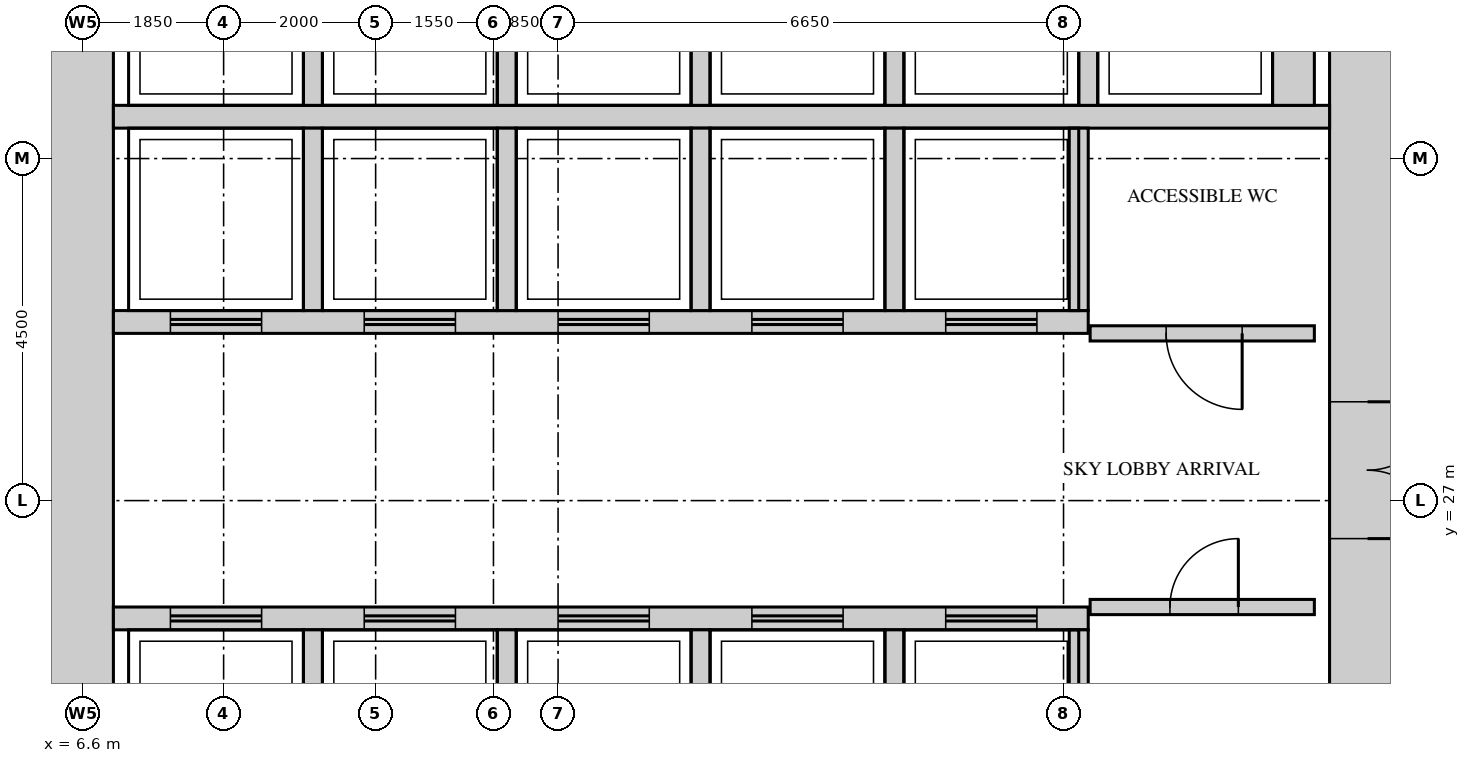
"""IFC4 building model, lengths in metres.
Left out: names, types, materials, properties, quantities, classifications, styles, units other than length and angle.
Written with IfcOpenShell. Run it as: python <this file> out.ifc"""

import sys

from ifc_helpers import new_model, si_unit, direction, frame, frame_2d, origin, place, context, subcontext, project, spatial, rectangle, extrude, source, transform, mapped, element, fill, save


model = new_model("IFC4")
c1 = context("Model", 3, precision=1e-05, world=origin(), true_north=direction((0.0, 1.0)))
c2 = subcontext(c1, "Body", "Model", "MODEL_VIEW")
j1 = project(units=[si_unit("LENGTHUNIT", "METRE"), si_unit("PLANEANGLEUNIT", "RADIAN")], contexts=[c1])
p1 = place(None, origin())
s1 = spatial("IfcSite", under=j1, at=p1, CompositionType="ELEMENT")
p2 = place(p1, origin())
s2 = spatial("IfcBuilding", under=s1, at=p2, CompositionType="ELEMENT")
p3 = place(p2, frame((0.0, 0.0, 158.7)))
s3 = spatial("IfcBuildingStorey", under=s2, at=p3, CompositionType="ELEMENT", Elevation=158.7)
m1 = source(origin(), c2, "Body", "SweptSolid", [
    extrude(rectangle(XDim=28.0, YDim=1.0, at=frame_2d((14.0, 0.0))), origin(), (0.0, 0.0, 1.0), 5.75),
])
p4 = place(p3, frame((23.5, 13.0, 0.0), z_axis=(0.0, 0.0, 1.0), x_axis=(0.0, 1.0, 0.0)))
e1 = element("IfcWall", 1, at=p4, inside=s3, PredefinedType="SHEAR", context=c2, shape_type="MappedRepresentation", body=[
    mapped(m1, transform((0.0, 0.0, 0.0))),
])
m2 = source(origin(), c2, "Body", "SweptSolid", [
    extrude(rectangle(XDim=1.8, YDim=2.1, at=frame_2d((0.9, 1.05))), frame((0.0, 0.51, 0.0), z_axis=(0.0, -1.0, 0.0), x_axis=(1.0, 0.0, 0.0)), (0.0, 0.0, 1.0), 1.02),
])
p5 = place(p4, frame((13.5, 0.0, 0.0)))
e2 = element("IfcOpeningElement", 2, at=p5, cuts=e1, PredefinedType="OPENING", context=c2, shape_type="MappedRepresentation", body=[
    mapped(m2, transform((0.0, 0.0, 0.0))),
])
p6 = place(p4, frame((22.6, 0.0, 0.0)))
e3 = element("IfcOpeningElement", 3, at=p6, cuts=e1, PredefinedType="OPENING", context=c2, shape_type="MappedRepresentation", body=[
    mapped(m2, transform((0.0, 0.0, 0.0))),
])
m3 = source(origin(), c2, "Body", "SweptSolid", [
    extrude(rectangle(XDim=0.9, YDim=2.1, at=frame_2d((0.45, 1.05))), frame((0.0, 0.51, 0.0), z_axis=(0.0, -1.0, 0.0), x_axis=(1.0, 0.0, 0.0)), (0.0, 0.0, 1.0), 1.02),
])
p7 = place(p4, frame((2.15, 0.0, 0.0)))
e4 = element("IfcOpeningElement", 4, at=p7, cuts=e1, PredefinedType="OPENING", context=c2, shape_type="MappedRepresentation", body=[
    mapped(m3, transform((0.0, 0.0, 0.0))),
])
p8 = place(p4, frame((7.0, 0.0, 0.0)))
e5 = element("IfcOpeningElement", 5, at=p8, cuts=e1, PredefinedType="OPENING", context=c2, shape_type="MappedRepresentation", body=[
    mapped(m3, transform((0.0, 0.0, 0.0))),
])
p9 = place(p3, frame((6.5, 13.0, 0.0), z_axis=(0.0, 0.0, 1.0), x_axis=(0.0, 1.0, 0.0)))
e6 = element("IfcWall", 6, at=p9, inside=s3, PredefinedType="SHEAR", context=c2, shape_type="MappedRepresentation", body=[
    mapped(m1, transform((0.0, 0.0, 0.0))),
])
m4 = source(origin(), c2, "Body", "SweptSolid", [
    extrude(rectangle(XDim=16.0, YDim=0.3, at=frame_2d((8.0, 0.0))), origin(), (0.0, 0.0, 1.0), 5.75),
])
p10 = place(p3, frame((7.0, 32.05, 0.0), z_axis=(0.0, 0.0, 1.0), x_axis=(1.0, 0.0, 0.0)))
e7 = element("IfcWall", 7, at=p10, inside=s3, PredefinedType="STANDARD", context=c2, shape_type="MappedRepresentation", body=[
    mapped(m4, transform((0.0, 0.0, 0.0))),
])
m5 = source(origin(), c2, "Body", "SweptSolid", [
    extrude(rectangle(XDim=12.825, YDim=0.3, at=frame_2d((6.413, 0.0))), origin(), (0.0, 0.0, 1.0), 5.75),
])
p11 = place(p3, frame((7.0, 29.35, 0.0), z_axis=(0.0, 0.0, 1.0), x_axis=(1.0, 0.0, 0.0)))
e8 = element("IfcWall", 8, at=p11, inside=s3, PredefinedType="STANDARD", context=c2, shape_type="MappedRepresentation", body=[
    mapped(m5, transform((0.0, 0.0, 0.0))),
])
m6 = source(origin(), c2, "Body", "SweptSolid", [
    extrude(rectangle(XDim=1.2, YDim=2.1, at=frame_2d((0.6, 1.05))), frame((0.0, 0.16, 0.0), z_axis=(0.0, -1.0, 0.0), x_axis=(1.0, 0.0, 0.0)), (0.0, 0.0, 1.0), 0.32),
])
p12 = place(p11, frame((0.75, 0.0, 0.0)))
e9 = element("IfcOpeningElement", 9, at=p12, cuts=e8, PredefinedType="OPENING", context=c2, shape_type="MappedRepresentation", body=[
    mapped(m6, transform((0.0, 0.0, 0.0))),
])
p13 = place(p11, frame((3.3, 0.0, 0.0)))
e10 = element("IfcOpeningElement", 10, at=p13, cuts=e8, PredefinedType="OPENING", context=c2, shape_type="MappedRepresentation", body=[
    mapped(m6, transform((0.0, 0.0, 0.0))),
])
p14 = place(p11, frame((5.85, 0.0, 0.0)))
e11 = element("IfcOpeningElement", 11, at=p14, cuts=e8, PredefinedType="OPENING", context=c2, shape_type="MappedRepresentation", body=[
    mapped(m6, transform((0.0, 0.0, 0.0))),
])
p15 = place(p11, frame((8.4, 0.0, 0.0)))
e12 = element("IfcOpeningElement", 12, at=p15, cuts=e8, PredefinedType="OPENING", context=c2, shape_type="MappedRepresentation", body=[
    mapped(m6, transform((0.0, 0.0, 0.0))),
])
p16 = place(p11, frame((10.95, 0.0, 0.0)))
e13 = element("IfcOpeningElement", 13, at=p16, cuts=e8, PredefinedType="OPENING", context=c2, shape_type="MappedRepresentation", body=[
    mapped(m6, transform((0.0, 0.0, 0.0))),
])
p17 = place(p3, frame((7.0, 25.45, 0.0), z_axis=(0.0, 0.0, 1.0), x_axis=(1.0, 0.0, 0.0)))
e14 = element("IfcWall", 14, at=p17, inside=s3, PredefinedType="STANDARD", context=c2, shape_type="MappedRepresentation", body=[
    mapped(m5, transform((0.0, 0.0, 0.0))),
])
p18 = place(p17, frame((0.75, 0.0, 0.0)))
e15 = element("IfcOpeningElement", 15, at=p18, cuts=e14, PredefinedType="OPENING", context=c2, shape_type="MappedRepresentation", body=[
    mapped(m6, transform((0.0, 0.0, 0.0))),
])
p19 = place(p17, frame((3.3, 0.0, 0.0)))
e16 = element("IfcOpeningElement", 16, at=p19, cuts=e14, PredefinedType="OPENING", context=c2, shape_type="MappedRepresentation", body=[
    mapped(m6, transform((0.0, 0.0, 0.0))),
])
p20 = place(p17, frame((5.85, 0.0, 0.0)))
e17 = element("IfcOpeningElement", 17, at=p20, cuts=e14, PredefinedType="OPENING", context=c2, shape_type="MappedRepresentation", body=[
    mapped(m6, transform((0.0, 0.0, 0.0))),
])
p21 = place(p17, frame((8.4, 0.0, 0.0)))
e18 = element("IfcOpeningElement", 18, at=p21, cuts=e14, PredefinedType="OPENING", context=c2, shape_type="MappedRepresentation", body=[
    mapped(m6, transform((0.0, 0.0, 0.0))),
])
p22 = place(p17, frame((10.95, 0.0, 0.0)))
e19 = element("IfcOpeningElement", 19, at=p22, cuts=e14, PredefinedType="OPENING", context=c2, shape_type="MappedRepresentation", body=[
    mapped(m6, transform((0.0, 0.0, 0.0))),
])
m7 = source(origin(), c2, "Body", "SweptSolid", [
    extrude(rectangle(XDim=2.4, YDim=0.25, at=frame_2d((1.2, 0.0))), origin(), (0.0, 0.0, 1.0), 5.75),
])
for number, where, z_axis, x_axis in (
    (20, (17.275, 29.5, 0.0), (0.0, 0.0, 1.0), (0.0, 1.0, 0.0)),
    (21, (19.7, 29.5, 0.0), (0.0, 0.0, 1.0), (0.0, 1.0, 0.0)),
    (22, (9.625, 29.5, 0.0), (0.0, 0.0, 1.0), (0.0, 1.0, 0.0)),
    (23, (12.175, 29.5, 0.0), (0.0, 0.0, 1.0), (0.0, 1.0, 0.0)),
    (24, (14.725, 29.5, 0.0), (0.0, 0.0, 1.0), (0.0, 1.0, 0.0)),
):
    element("IfcWall", number, at=place(p3, frame(where, z_axis=z_axis, x_axis=x_axis)), inside=s3, PredefinedType="STANDARD", context=c2, shape_type="MappedRepresentation", body=[
        mapped(m7, transform((0.0, 0.0, 0.0))),
    ])
m8 = source(origin(), c2, "Body", "SweptSolid", [
    extrude(rectangle(XDim=2.4, YDim=0.25, at=frame_2d((1.2, 0.0))), origin(), (0.0, 0.0, 1.0), 5.75),
])
for number, where, z_axis, x_axis in (
    (25, (17.275, 22.9, 0.0), (0.0, 0.0, 1.0), (0.0, 1.0, 0.0)),
    (26, (19.7, 22.9, 0.0), (0.0, 0.0, 1.0), (0.0, 1.0, 0.0)),
    (27, (9.625, 22.9, 0.0), (0.0, 0.0, 1.0), (0.0, 1.0, 0.0)),
    (28, (12.175, 22.9, 0.0), (0.0, 0.0, 1.0), (0.0, 1.0, 0.0)),
    (29, (14.725, 22.9, 0.0), (0.0, 0.0, 1.0), (0.0, 1.0, 0.0)),
    (30, (9.625, 32.2, 0.0), (0.0, 0.0, 1.0), (0.0, 1.0, 0.0)),
    (31, (12.175, 32.2, 0.0), (0.0, 0.0, 1.0), (0.0, 1.0, 0.0)),
    (32, (14.725, 32.2, 0.0), (0.0, 0.0, 1.0), (0.0, 1.0, 0.0)),
    (33, (17.275, 32.2, 0.0), (0.0, 0.0, 1.0), (0.0, 1.0, 0.0)),
    (34, (19.825, 32.2, 0.0), (0.0, 0.0, 1.0), (0.0, 1.0, 0.0)),
):
    element("IfcWall", number, at=place(p3, frame(where, z_axis=z_axis, x_axis=x_axis)), inside=s3, PredefinedType="STANDARD", context=c2, shape_type="MappedRepresentation", body=[
        mapped(m8, transform((0.0, 0.0, 0.0))),
    ])
m9 = source(origin(), c2, "Body", "SweptSolid", [
    extrude(rectangle(XDim=2.4, YDim=0.55, at=frame_2d((1.2, 0.0))), origin(), (0.0, 0.0, 1.0), 5.75),
])
p23 = place(p3, frame((22.525, 32.2, 0.0), z_axis=(0.0, 0.0, 1.0), x_axis=(0.0, 1.0, 0.0)))
e35 = element("IfcWall", 35, at=p23, inside=s3, PredefinedType="STANDARD", context=c2, shape_type="MappedRepresentation", body=[
    mapped(m9, transform((0.0, 0.0, 0.0))),
])
m10 = source(origin(), c2, "Body", "SweptSolid", [
    extrude(rectangle(XDim=2.95, YDim=0.2, at=frame_2d((1.475, 0.0))), origin(), (0.0, 0.0, 1.0), 5.75),
])
p24 = place(p3, frame((19.85, 25.6, 0.0), z_axis=(0.0, 0.0, 1.0), x_axis=(1.0, 0.0, 0.0)))
e36 = element("IfcWall", 36, at=p24, inside=s3, PredefinedType="PARTITIONING", context=c2, shape_type="MappedRepresentation", body=[
    mapped(m10, transform((0.0, 0.0, 0.0))),
])
m11 = source(origin(), c2, "Body", "SweptSolid", [
    extrude(rectangle(XDim=0.9, YDim=2.1, at=frame_2d((0.45, 1.05))), frame((0.0, 0.11, 0.0), z_axis=(0.0, -1.0, 0.0), x_axis=(1.0, 0.0, 0.0)), (0.0, 0.0, 1.0), 0.22),
])
p25 = place(p24, frame((1.05, 0.0, 0.0)))
e37 = element("IfcOpeningElement", 37, at=p25, cuts=e36, PredefinedType="OPENING", context=c2, shape_type="MappedRepresentation", body=[
    mapped(m11, transform((0.0, 0.0, 0.0))),
])
p26 = place(p3, frame((19.85, 29.2, 0.0), z_axis=(0.0, 0.0, 1.0), x_axis=(1.0, 0.0, 0.0)))
e38 = element("IfcWall", 38, at=p26, inside=s3, PredefinedType="PARTITIONING", context=c2, shape_type="MappedRepresentation", body=[
    mapped(m10, transform((0.0, 0.0, 0.0))),
])
m12 = source(origin(), c2, "Body", "SweptSolid", [
    extrude(rectangle(XDim=1.0, YDim=2.1, at=frame_2d((0.5, 1.05))), frame((0.0, 0.11, 0.0), z_axis=(0.0, -1.0, 0.0), x_axis=(1.0, 0.0, 0.0)), (0.0, 0.0, 1.0), 0.22),
])
p27 = place(p26, frame((1.0, 0.0, 0.0)))
e39 = element("IfcOpeningElement", 39, at=p27, cuts=e38, PredefinedType="OPENING", context=c2, shape_type="MappedRepresentation", body=[
    mapped(m12, transform((0.0, 0.0, 0.0))),
])
m13 = source(origin(), c2, "Body", "SweptSolid", [
    extrude(rectangle(XDim=1.8, YDim=2.1, at=frame_2d((0.9, 1.05))), frame((0.0, 0.45, 0.0), z_axis=(0.0, -1.0, 0.0), x_axis=(1.0, 0.0, 0.0)), (0.0, 0.0, 1.0), 0.9),
])
p28 = place(p5, origin())
e40 = element("IfcDoor", 40, at=p28, inside=s3, OperationType="DOUBLE_DOOR_SINGLE_SWING", PredefinedType="DOOR", context=c2, shape_type="MappedRepresentation", body=[
    mapped(m13, transform((0.0, 0.0, 0.0))),
])
fill(e2, e40)
m14 = source(origin(), c2, "Body", "SweptSolid", [
    extrude(rectangle(XDim=1.0, YDim=2.1, at=frame_2d((0.5, 1.05))), frame((0.0, 0.025, 0.0), z_axis=(0.0, -1.0, 0.0), x_axis=(1.0, 0.0, 0.0)), (0.0, 0.0, 1.0), 0.05),
])
p29 = place(p27, origin())
e41 = element("IfcDoor", 41, at=p29, inside=s3, OperationType="SINGLE_SWING_RIGHT", PredefinedType="DOOR", context=c2, shape_type="MappedRepresentation", body=[
    mapped(m14, transform((0.0, 0.0, 0.0))),
])
fill(e39, e41)
m15 = source(origin(), c2, "Body", "SweptSolid", [
    extrude(rectangle(XDim=0.9, YDim=2.1, at=frame_2d((0.45, 1.05))), frame((0.0, 0.025, 0.0), z_axis=(0.0, -1.0, 0.0), x_axis=(1.0, 0.0, 0.0)), (0.0, 0.0, 1.0), 0.05),
])
p30 = place(p25, origin())
e42 = element("IfcDoor", 42, at=p30, inside=s3, OperationType="SINGLE_SWING_LEFT", PredefinedType="DOOR", context=c2, shape_type="MappedRepresentation", body=[
    mapped(m15, transform((0.0, 0.0, 0.0))),
])
fill(e37, e42)
m16 = source(origin(), c2, "Body", "SweptSolid", [
    extrude(rectangle(XDim=1.2, YDim=2.1, at=frame_2d((0.6, 1.05))), frame((0.0, 0.025, 0.0), z_axis=(0.0, -1.0, 0.0), x_axis=(1.0, 0.0, 0.0)), (0.0, 0.0, 1.0), 0.05),
])
p31 = place(p18, origin())
e43 = element("IfcDoor", 43, at=p31, inside=s3, OperationType="DOUBLE_DOOR_SLIDING", PredefinedType="DOOR", context=c2, shape_type="MappedRepresentation", body=[
    mapped(m16, transform((0.0, 0.0, 0.0))),
])
fill(e15, e43)
p32 = place(p19, origin())
e44 = element("IfcDoor", 44, at=p32, inside=s3, OperationType="DOUBLE_DOOR_SLIDING", PredefinedType="DOOR", context=c2, shape_type="MappedRepresentation", body=[
    mapped(m16, transform((0.0, 0.0, 0.0))),
])
fill(e16, e44)
p33 = place(p20, origin())
e45 = element("IfcDoor", 45, at=p33, inside=s3, OperationType="DOUBLE_DOOR_SLIDING", PredefinedType="DOOR", context=c2, shape_type="MappedRepresentation", body=[
    mapped(m16, transform((0.0, 0.0, 0.0))),
])
fill(e17, e45)
p34 = place(p21, origin())
e46 = element("IfcDoor", 46, at=p34, inside=s3, OperationType="DOUBLE_DOOR_SLIDING", PredefinedType="DOOR", context=c2, shape_type="MappedRepresentation", body=[
    mapped(m16, transform((0.0, 0.0, 0.0))),
])
fill(e18, e46)
p35 = place(p22, origin())
e47 = element("IfcDoor", 47, at=p35, inside=s3, OperationType="DOUBLE_DOOR_SLIDING", PredefinedType="DOOR", context=c2, shape_type="MappedRepresentation", body=[
    mapped(m16, transform((0.0, 0.0, 0.0))),
])
fill(e19, e47)
p36 = place(p12, origin())
e48 = element("IfcDoor", 48, at=p36, inside=s3, OperationType="DOUBLE_DOOR_SLIDING", PredefinedType="DOOR", context=c2, shape_type="MappedRepresentation", body=[
    mapped(m16, transform((0.0, 0.0, 0.0))),
])
fill(e9, e48)
p37 = place(p13, origin())
e49 = element("IfcDoor", 49, at=p37, inside=s3, OperationType="DOUBLE_DOOR_SLIDING", PredefinedType="DOOR", context=c2, shape_type="MappedRepresentation", body=[
    mapped(m16, transform((0.0, 0.0, 0.0))),
])
fill(e10, e49)
p38 = place(p14, origin())
e50 = element("IfcDoor", 50, at=p38, inside=s3, OperationType="DOUBLE_DOOR_SLIDING", PredefinedType="DOOR", context=c2, shape_type="MappedRepresentation", body=[
    mapped(m16, transform((0.0, 0.0, 0.0))),
])
fill(e11, e50)
p39 = place(p15, origin())
e51 = element("IfcDoor", 51, at=p39, inside=s3, OperationType="DOUBLE_DOOR_SLIDING", PredefinedType="DOOR", context=c2, shape_type="MappedRepresentation", body=[
    mapped(m16, transform((0.0, 0.0, 0.0))),
])
fill(e12, e51)
p40 = place(p16, origin())
e52 = element("IfcDoor", 52, at=p40, inside=s3, OperationType="DOUBLE_DOOR_SLIDING", PredefinedType="DOOR", context=c2, shape_type="MappedRepresentation", body=[
    mapped(m16, transform((0.0, 0.0, 0.0))),
])
fill(e13, e52)
save(model, sys.argv[1])
